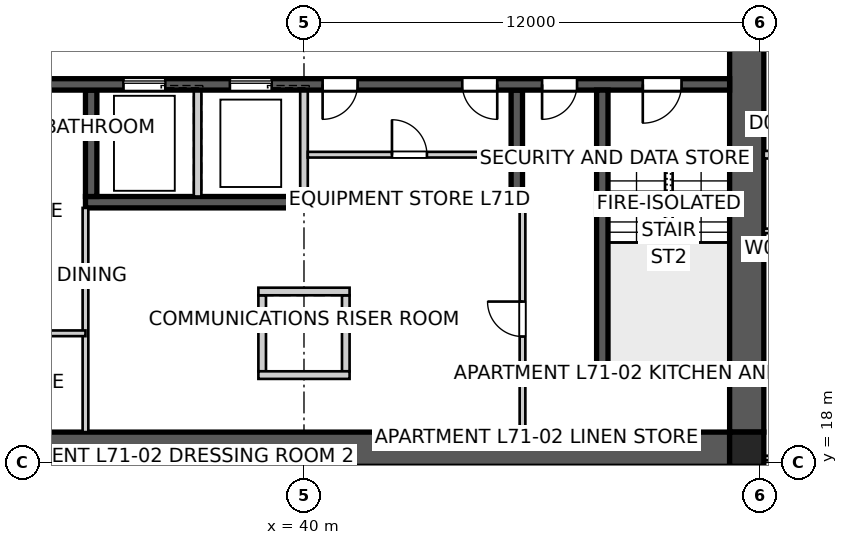
"""IFC4 building model, lengths in metres.
Left out: names, types, materials, properties, quantities, classifications, styles, units other than length and angle.
Written with IfcOpenShell. Run it as: python <this file> out.ifc"""

import sys

from ifc_helpers import new_model, si_unit, direction, frame, frame_2d, origin, origin_2d, place, context, subcontext, project, spatial, polyline, rectangle, outline, extrude, element, fill, save


model = new_model("IFC4")
c1 = context("Model", 3, precision=1e-05, world=origin(), true_north=direction((0.0, 1.0)))
c2 = subcontext(c1, "Body", "Model", "MODEL_VIEW")
j1 = project(units=[si_unit("LENGTHUNIT", "METRE"), si_unit("PLANEANGLEUNIT", "RADIAN")], contexts=[c1])
p1 = place(None, origin())
s1 = spatial("IfcSite", under=j1, at=p1, CompositionType="ELEMENT")
p2 = place(p1, origin())
s2 = spatial("IfcBuilding", under=s1, at=p2, CompositionType="ELEMENT")
p3 = place(p2, frame((0.0, 0.0, 257.4)))
s3 = spatial("IfcBuildingStorey", under=s2, at=p3, CompositionType="ELEMENT", Elevation=257.4)
p4 = place(p3, frame((51.2, 18.35, 0.0), z_axis=(0.0, 0.0, 1.0), x_axis=(-1.0, 0.0, 0.0)))
e1 = element("IfcWall", 1, at=p4, inside=s3, PredefinedType="SHEAR", context=c2, shape_type="SweptSolid", body=[
    extrude(outline(polyline([(0.0, -0.45), (22.4, -0.45), (22.4, -0.025), (22.85, -0.025), (22.85, 0.025), (22.4, 0.025), (22.4, 0.45), (0.0, 0.45), (0.0, 0.025), (-0.45, 0.025), (-0.45, -0.025), (0.0, -0.025), (0.0, -0.45)])), origin(), (0.0, 0.0, 1.0), 3.4),
])
p5 = place(p3, frame((51.65, 18.8, 0.0), z_axis=(0.0, 0.0, 1.0), x_axis=(0.0, 1.0, 0.0)))
e2 = element("IfcWall", 2, at=p5, inside=s3, PredefinedType="SHEAR", context=c2, shape_type="SweptSolid", body=[
    extrude(outline(polyline([(0.0, -0.45), (22.4, -0.45), (22.4, -0.025), (22.85, -0.025), (22.85, 0.025), (22.4, 0.025), (22.4, 0.45), (0.0, 0.45), (0.0, 0.025), (-0.45, 0.025), (-0.45, -0.025), (0.0, -0.025), (0.0, -0.45)])), origin(), (0.0, 0.0, 1.0), 3.4),
])
p6 = place(p5, frame((11.14, 0.0, 0.0)))
e3 = element("IfcOpeningElement", 3, at=p6, cuts=e2, PredefinedType="OPENING", context=c2, shape_type="SweptSolid", body=[
    extrude(rectangle(XDim=1.02, YDim=2.4, at=frame_2d((0.51, 1.2))), frame((0.0, 0.46, 0.0), z_axis=(0.0, -1.0, 0.0), x_axis=(1.0, 0.0, 0.0)), (0.0, 0.0, 1.0), 0.92),
])
p7 = place(p3, frame((51.2, 27.95, 0.0), z_axis=(0.0, 0.0, 1.0), x_axis=(-1.0, 0.0, 0.0)))
e4 = element("IfcWall", 4, at=p7, inside=s3, PredefinedType="SHEAR", context=c2, shape_type="SweptSolid", body=[
    extrude(rectangle(XDim=22.4, YDim=0.3, at=frame_2d((11.2, 0.0))), origin(), (0.0, 0.0, 1.0), 3.4),
])
p8 = place(p7, frame((19.04, 0.0, 0.0)))
e5 = element("IfcOpeningElement", 5, at=p8, cuts=e4, PredefinedType="OPENING", context=c2, shape_type="SweptSolid", body=[
    extrude(rectangle(XDim=0.92, YDim=2.1, at=frame_2d((0.46, 1.05))), frame((0.0, 0.16, 0.0), z_axis=(0.0, -1.0, 0.0), x_axis=(1.0, 0.0, 0.0)), (0.0, 0.0, 1.0), 0.32),
])
p9 = place(p7, frame((1.265, 0.0, 0.0)))
e6 = element("IfcOpeningElement", 6, at=p9, cuts=e4, PredefinedType="OPENING", context=c2, shape_type="SweptSolid", body=[
    extrude(rectangle(XDim=1.02, YDim=2.1, at=frame_2d((0.51, 1.05))), frame((0.0, 0.16, 0.0), z_axis=(0.0, -1.0, 0.0), x_axis=(1.0, 0.0, 0.0)), (0.0, 0.0, 1.0), 0.32),
])
p10 = place(p7, frame((4.015, 0.0, 0.0)))
e7 = element("IfcOpeningElement", 7, at=p10, cuts=e4, PredefinedType="OPENING", context=c2, shape_type="SweptSolid", body=[
    extrude(rectangle(XDim=0.92, YDim=2.1, at=frame_2d((0.46, 1.05))), frame((0.0, 0.16, 0.0), z_axis=(0.0, -1.0, 0.0), x_axis=(1.0, 0.0, 0.0)), (0.0, 0.0, 1.0), 0.32),
])
p11 = place(p7, frame((9.79, 0.0, 0.0)))
e8 = element("IfcOpeningElement", 8, at=p11, cuts=e4, PredefinedType="OPENING", context=c2, shape_type="SweptSolid", body=[
    extrude(rectangle(XDim=0.92, YDim=2.1, at=frame_2d((0.46, 1.05))), frame((0.0, 0.16, 0.0), z_axis=(0.0, -1.0, 0.0), x_axis=(1.0, 0.0, 0.0)), (0.0, 0.0, 1.0), 0.32),
])
p12 = place(p7, frame((6.115, 0.0, 0.0)))
e9 = element("IfcOpeningElement", 9, at=p12, cuts=e4, PredefinedType="OPENING", context=c2, shape_type="SweptSolid", body=[
    extrude(rectangle(XDim=0.92, YDim=2.1, at=frame_2d((0.46, 1.05))), frame((0.0, 0.16, 0.0), z_axis=(0.0, -1.0, 0.0), x_axis=(1.0, 0.0, 0.0)), (0.0, 0.0, 1.0), 0.32),
])
p13 = place(p7, frame((12.05, 0.0, 0.0)))
e10 = element("IfcOpeningElement", 10, at=p13, cuts=e4, PredefinedType="OPENING", context=c2, shape_type="SweptSolid", body=[
    extrude(rectangle(XDim=1.1, YDim=2.1, at=frame_2d((0.55, 1.05))), frame((0.0, 0.16, 0.0), z_axis=(0.0, -1.0, 0.0), x_axis=(1.0, 0.0, 0.0)), (0.0, 0.0, 1.0), 0.32),
])
p14 = place(p7, frame((14.85, 0.0, 0.0)))
e11 = element("IfcOpeningElement", 11, at=p14, cuts=e4, PredefinedType="OPENING", context=c2, shape_type="SweptSolid", body=[
    extrude(rectangle(XDim=1.1, YDim=2.1, at=frame_2d((0.55, 1.05))), frame((0.0, 0.16, 0.0), z_axis=(0.0, -1.0, 0.0), x_axis=(1.0, 0.0, 0.0)), (0.0, 0.0, 1.0), 0.32),
])
p15 = place(p3, frame((45.75, 24.85, 0.0), z_axis=(0.0, 0.0, 1.0), x_axis=(-1.0, 0.0, 0.0)))
e12 = element("IfcWall", 12, at=p15, inside=s3, PredefinedType="SHEAR", context=c2, shape_type="SweptSolid", body=[
    extrude(rectangle(XDim=11.5, YDim=0.3, at=frame_2d((5.75, 0.0))), origin(), (0.0, 0.0, 1.0), 3.4),
])
p16 = place(p3, frame((45.6, 27.8, 0.0), z_axis=(0.0, 0.0, 1.0), x_axis=(0.0, -1.0, 0.0)))
e13 = element("IfcWall", 13, at=p16, inside=s3, PredefinedType="SHEAR", context=c2, shape_type="SweptSolid", body=[
    extrude(rectangle(XDim=2.8, YDim=0.3, at=frame_2d((1.4, 0.0))), origin(), (0.0, 0.0, 1.0), 3.4),
])
for number, where, z_axis, x_axis in (
    (14, (40.0, 27.8, 0.0), (0.0, 0.0, 1.0), (0.0, -1.0, 0.0)),
    (15, (37.2, 27.8, 0.0), (0.0, 0.0, 1.0), (0.0, -1.0, 0.0)),
):
    element("IfcWall", number, at=place(p3, frame(where, z_axis=z_axis, x_axis=x_axis)), inside=s3, PredefinedType="SOLIDWALL", context=c2, shape_type="SweptSolid", body=[
        extrude(rectangle(XDim=2.8, YDim=0.2, at=frame_2d((1.4, 0.0))), origin(), (0.0, 0.0, 1.0), 3.4),
    ])
p17 = place(p3, frame((34.4, 27.8, 0.0), z_axis=(0.0, 0.0, 1.0), x_axis=(0.0, -1.0, 0.0)))
e16 = element("IfcWall", 16, at=p17, inside=s3, PredefinedType="SHEAR", context=c2, shape_type="SweptSolid", body=[
    extrude(rectangle(XDim=2.8, YDim=0.3, at=frame_2d((1.4, 0.0))), origin(), (0.0, 0.0, 1.0), 3.4),
])
p18 = place(p3, frame((47.85, 27.8, 0.0), z_axis=(0.0, 0.0, 1.0), x_axis=(0.0, -1.0, 0.0)))
e17 = element("IfcWall", 17, at=p18, inside=s3, PredefinedType="SHEAR", context=c2, shape_type="SweptSolid", body=[
    extrude(rectangle(XDim=7.7, YDim=0.3, at=frame_2d((3.85, 0.0))), origin(), (0.0, 0.0, 1.0), 3.4),
])
p19 = place(p3, frame((51.2, 20.25, 0.0), z_axis=(0.0, 0.0, 1.0), x_axis=(-1.0, 0.0, 0.0)))
e18 = element("IfcWall", 18, at=p19, inside=s3, PredefinedType="SHEAR", context=c2, shape_type="SweptSolid", body=[
    extrude(rectangle(XDim=3.5, YDim=0.3, at=frame_2d((1.75, 0.0))), origin(), (0.0, 0.0, 1.0), 3.4),
])
for number, where, z_axis, x_axis in (
    (19, (38.9, 22.4, 0.0), (0.0, 0.0, 1.0), (0.0, -1.0, 0.0)),
    (20, (41.1, 22.4, 0.0), (0.0, 0.0, 1.0), (0.0, -1.0, 0.0)),
):
    element("IfcWall", number, at=place(p3, frame(where, z_axis=z_axis, x_axis=x_axis)), inside=s3, PredefinedType="SOLIDWALL", context=c2, shape_type="SweptSolid", body=[
        extrude(rectangle(XDim=2.0, YDim=0.2, at=frame_2d((1.0, 0.0))), origin(), (0.0, 0.0, 1.0), 3.4),
    ])
for number, where, z_axis, x_axis in (
    (21, (38.8, 22.5, 0.0), (0.0, 0.0, 1.0), (1.0, 0.0, 0.0)),
    (22, (38.8, 20.3, 0.0), (0.0, 0.0, 1.0), (1.0, 0.0, 0.0)),
):
    element("IfcWall", number, at=place(p3, frame(where, z_axis=z_axis, x_axis=x_axis)), inside=s3, PredefinedType="SOLIDWALL", context=c2, shape_type="SweptSolid", body=[
        extrude(rectangle(XDim=2.4, YDim=0.2, at=frame_2d((1.2, 0.0))), origin(), (0.0, 0.0, 1.0), 3.4),
    ])
p20 = place(p3, frame((51.65, 18.35, 0.0), z_axis=(0.0, 0.0, 1.0), x_axis=(1.0, 0.0, 0.0)))
e23 = element("IfcColumn", 23, at=p20, inside=s3, PredefinedType="COLUMN", context=c2, shape_type="SweptSolid", body=[
    extrude(rectangle(XDim=0.9, YDim=0.9, at=origin_2d()), origin(), (0.0, 0.0, 1.0), 3.4),
])
p21 = place(p3, frame((52.1, 26.1, 0.0), z_axis=(0.0, 0.0, 1.0), x_axis=(1.0, 0.0, 0.0)))
e24 = element("IfcWall", 24, at=p21, inside=s3, PredefinedType="PARTITIONING", context=c2, shape_type="SweptSolid", body=[
    extrude(rectangle(XDim=3.3, YDim=0.2, at=frame_2d((1.65, 0.0))), origin(), (0.0, 0.0, 1.0), 3.25),
])
p22 = place(p21, frame((1.04, 0.0, 0.0)))
e25 = element("IfcOpeningElement", 25, at=p22, cuts=e24, PredefinedType="OPENING", context=c2, shape_type="SweptSolid", body=[
    extrude(rectangle(XDim=1.02, YDim=2.34, at=frame_2d((0.51, 1.17))), frame((0.0, 0.11, 0.0), z_axis=(0.0, -1.0, 0.0), x_axis=(1.0, 0.0, 0.0)), (0.0, 0.0, 1.0), 0.22),
])
p23 = place(p3, frame((45.75, 18.8, 0.0), z_axis=(0.0, 0.0, 1.0), x_axis=(0.0, 1.0, 0.0)))
e26 = element("IfcWall", 26, at=p23, inside=s3, PredefinedType="SOLIDWALL", context=c2, shape_type="SweptSolid", body=[
    extrude(rectangle(XDim=5.95, YDim=0.15, at=frame_2d((2.975, 0.0))), origin(), (0.0, 0.0, 1.0), 3.25),
])
p24 = place(p23, frame((2.515, 0.0, 0.0)))
e27 = element("IfcOpeningElement", 27, at=p24, cuts=e26, PredefinedType="OPENING", context=c2, shape_type="SweptSolid", body=[
    extrude(rectangle(XDim=0.92, YDim=2.1, at=frame_2d((0.46, 1.05))), frame((0.0, 0.085, 0.0), z_axis=(0.0, -1.0, 0.0), x_axis=(1.0, 0.0, 0.0)), (0.0, 0.0, 1.0), 0.17),
])
p25 = place(p3, frame((34.25, 18.8, 0.0), z_axis=(0.0, 0.0, 1.0), x_axis=(0.0, 1.0, 0.0)))
e28 = element("IfcWall", 28, at=p25, inside=s3, PredefinedType="SOLIDWALL", context=c2, shape_type="SweptSolid", body=[
    extrude(rectangle(XDim=5.9, YDim=0.15, at=frame_2d((2.95, 0.0))), origin(), (0.0, 0.0, 1.0), 3.25),
])
p26 = place(p3, frame((34.25, 21.4, 0.0), z_axis=(0.0, 0.0, 1.0), x_axis=(-1.0, 0.0, 0.0)))
e29 = element("IfcWall", 29, at=p26, inside=s3, PredefinedType="SOLIDWALL", context=c2, shape_type="SweptSolid", body=[
    extrude(rectangle(XDim=5.45, YDim=0.15, at=frame_2d((2.725, 0.0))), origin(), (0.0, 0.0, 1.0), 3.25),
])
p27 = place(p26, frame((2.265, 0.0, 0.0)))
e30 = element("IfcOpeningElement", 30, at=p27, cuts=e29, PredefinedType="OPENING", context=c2, shape_type="SweptSolid", body=[
    extrude(rectangle(XDim=0.92, YDim=2.1, at=frame_2d((0.46, 1.05))), frame((0.0, 0.085, 0.0), z_axis=(0.0, -1.0, 0.0), x_axis=(1.0, 0.0, 0.0)), (0.0, 0.0, 1.0), 0.17),
])
p28 = place(p3, frame((56.0, 24.095, 0.0), z_axis=(0.0, 0.0, 1.0), x_axis=(-1.0, 0.0, 0.0)))
e31 = element("IfcWall", 31, at=p28, inside=s3, PredefinedType="PARTITIONING", context=c2, shape_type="SweptSolid", body=[
    extrude(rectangle(XDim=3.9, YDim=0.12, at=frame_2d((1.95, 0.0))), origin(), (0.0, 0.0, 1.0), 2.796),
])
p29 = place(p28, frame((1.49, 0.0, 0.0)))
e32 = element("IfcOpeningElement", 32, at=p29, cuts=e31, PredefinedType="OPENING", context=c2, shape_type="SweptSolid", body=[
    extrude(rectangle(XDim=0.92, YDim=2.34, at=frame_2d((0.46, 1.17))), frame((0.0, 0.07, 0.0), z_axis=(0.0, -1.0, 0.0), x_axis=(1.0, 0.0, 0.0)), (0.0, 0.0, 1.0), 0.14),
])
p30 = place(p3, frame((51.722, 14.0, 0.0), z_axis=(0.0, 0.0, 1.0), x_axis=(0.0, 1.0, 0.0)))
e33 = element("IfcWall", 33, at=p30, inside=s3, PredefinedType="SOLIDWALL", context=c2, shape_type="SweptSolid", body=[
    extrude(rectangle(XDim=4.82, YDim=0.15, at=frame_2d((2.41, 0.0))), origin(), (0.0, 0.0, 1.0), 3.25),
])
p31 = place(p30, frame((1.49, 0.0, 0.0)))
e34 = element("IfcOpeningElement", 34, at=p31, cuts=e33, PredefinedType="OPENING", context=c2, shape_type="SweptSolid", body=[
    extrude(rectangle(XDim=0.92, YDim=2.1, at=frame_2d((0.46, 1.05))), frame((0.0, 0.085, 0.0), z_axis=(0.0, -1.0, 0.0), x_axis=(1.0, 0.0, 0.0)), (0.0, 0.0, 1.0), 0.17),
])
p32 = place(p3, frame((51.777, 18.118, 0.0), z_axis=(0.0, 0.0, 1.0), x_axis=(1.0, 0.0, 0.0)))
e35 = element("IfcWall", 35, at=p32, inside=s3, PredefinedType="PARTITIONING", context=c2, shape_type="SweptSolid", body=[
    extrude(rectangle(XDim=4.223, YDim=0.12, at=frame_2d((2.111, 0.0))), origin(), (0.0, 0.0, 1.0), 3.25),
])
p33 = place(p32, frame((1.812, 0.0, 0.0)))
e36 = element("IfcOpeningElement", 36, at=p33, cuts=e35, PredefinedType="OPENING", context=c2, shape_type="SweptSolid", body=[
    extrude(rectangle(XDim=0.92, YDim=2.1, at=frame_2d((0.46, 1.05))), frame((0.0, 0.07, 0.0), z_axis=(0.0, -1.0, 0.0), x_axis=(1.0, 0.0, 0.0)), (0.0, 0.0, 1.0), 0.14),
])
p34 = place(p3, frame((40.1, 26.1, 0.0), z_axis=(0.0, 0.0, 1.0), x_axis=(1.0, 0.0, 0.0)))
e37 = element("IfcWall", 37, at=p34, inside=s3, PredefinedType="SOLIDWALL", context=c2, shape_type="SweptSolid", body=[
    extrude(rectangle(XDim=5.35, YDim=0.15, at=frame_2d((2.675, 0.0))), origin(), (0.0, 0.0, 1.0), 3.25),
])
p35 = place(p34, frame((2.215, 0.0, 0.0)))
e38 = element("IfcOpeningElement", 38, at=p35, cuts=e37, PredefinedType="OPENING", context=c2, shape_type="SweptSolid", body=[
    extrude(rectangle(XDim=0.92, YDim=2.1, at=frame_2d((0.46, 1.05))), frame((0.0, 0.085, 0.0), z_axis=(0.0, -1.0, 0.0), x_axis=(1.0, 0.0, 0.0)), (0.0, 0.0, 1.0), 0.17),
])
p36 = place(p9, origin())
e39 = element("IfcDoor", 39, at=p36, inside=s3, OperationType="SINGLE_SWING_RIGHT", PredefinedType="DOOR", context=c2, shape_type="SweptSolid", body=[
    extrude(rectangle(XDim=1.02, YDim=2.1, at=frame_2d((0.51, 1.05))), frame((0.0, 0.025, 0.0), z_axis=(0.0, -1.0, 0.0), x_axis=(1.0, 0.0, 0.0)), (0.0, 0.0, 1.0), 0.05),
])
fill(e6, e39)
p37 = place(p10, origin())
e40 = element("IfcDoor", 40, at=p37, inside=s3, OperationType="SINGLE_SWING_RIGHT", PredefinedType="DOOR", context=c2, shape_type="SweptSolid", body=[
    extrude(rectangle(XDim=0.92, YDim=2.1, at=frame_2d((0.46, 1.05))), frame((0.0, 0.025, 0.0), z_axis=(0.0, -1.0, 0.0), x_axis=(1.0, 0.0, 0.0)), (0.0, 0.0, 1.0), 0.05),
])
fill(e7, e40)
p38 = place(p24, origin())
e41 = element("IfcDoor", 41, at=p38, inside=s3, OperationType="SINGLE_SWING_RIGHT", PredefinedType="DOOR", context=c2, shape_type="SweptSolid", body=[
    extrude(rectangle(XDim=0.92, YDim=2.1, at=frame_2d((0.46, 1.05))), frame((0.0, 0.025, 0.0), z_axis=(0.0, -1.0, 0.0), x_axis=(1.0, 0.0, 0.0)), (0.0, 0.0, 1.0), 0.05),
])
fill(e27, e41)
p39 = place(p11, origin())
e42 = element("IfcDoor", 42, at=p39, inside=s3, OperationType="SINGLE_SWING_RIGHT", PredefinedType="DOOR", context=c2, shape_type="SweptSolid", body=[
    extrude(rectangle(XDim=0.92, YDim=2.1, at=frame_2d((0.46, 1.05))), frame((0.0, 0.025, 0.0), z_axis=(0.0, -1.0, 0.0), x_axis=(1.0, 0.0, 0.0)), (0.0, 0.0, 1.0), 0.05),
])
fill(e8, e42)
p40 = place(p12, origin())
e43 = element("IfcDoor", 43, at=p40, inside=s3, OperationType="SINGLE_SWING_LEFT", PredefinedType="DOOR", context=c2, shape_type="SweptSolid", body=[
    extrude(rectangle(XDim=0.92, YDim=2.1, at=frame_2d((0.46, 1.05))), frame((0.0, 0.025, 0.0), z_axis=(0.0, -1.0, 0.0), x_axis=(1.0, 0.0, 0.0)), (0.0, 0.0, 1.0), 0.05),
])
fill(e9, e43)
p41 = place(p35, origin())
e44 = element("IfcDoor", 44, at=p41, inside=s3, OperationType="SINGLE_SWING_LEFT", PredefinedType="DOOR", context=c2, shape_type="SweptSolid", body=[
    extrude(rectangle(XDim=0.92, YDim=2.1, at=frame_2d((0.46, 1.05))), frame((0.0, 0.025, 0.0), z_axis=(0.0, -1.0, 0.0), x_axis=(1.0, 0.0, 0.0)), (0.0, 0.0, 1.0), 0.05),
])
fill(e38, e44)
p42 = place(p13, origin())
e45 = element("IfcDoor", 45, at=p42, inside=s3, OperationType="SLIDING_TO_LEFT", PredefinedType="DOOR", context=c2, shape_type="SweptSolid", body=[
    extrude(rectangle(XDim=1.1, YDim=2.1, at=frame_2d((0.55, 1.05))), frame((0.0, 0.025, 0.0), z_axis=(0.0, -1.0, 0.0), x_axis=(1.0, 0.0, 0.0)), (0.0, 0.0, 1.0), 0.05),
])
fill(e10, e45)
p43 = place(p14, origin())
e46 = element("IfcDoor", 46, at=p43, inside=s3, OperationType="SLIDING_TO_LEFT", PredefinedType="DOOR", context=c2, shape_type="SweptSolid", body=[
    extrude(rectangle(XDim=1.1, YDim=2.1, at=frame_2d((0.55, 1.05))), frame((0.0, 0.025, 0.0), z_axis=(0.0, -1.0, 0.0), x_axis=(1.0, 0.0, 0.0)), (0.0, 0.0, 1.0), 0.05),
])
fill(e11, e46)
save(model, sys.argv[1])
